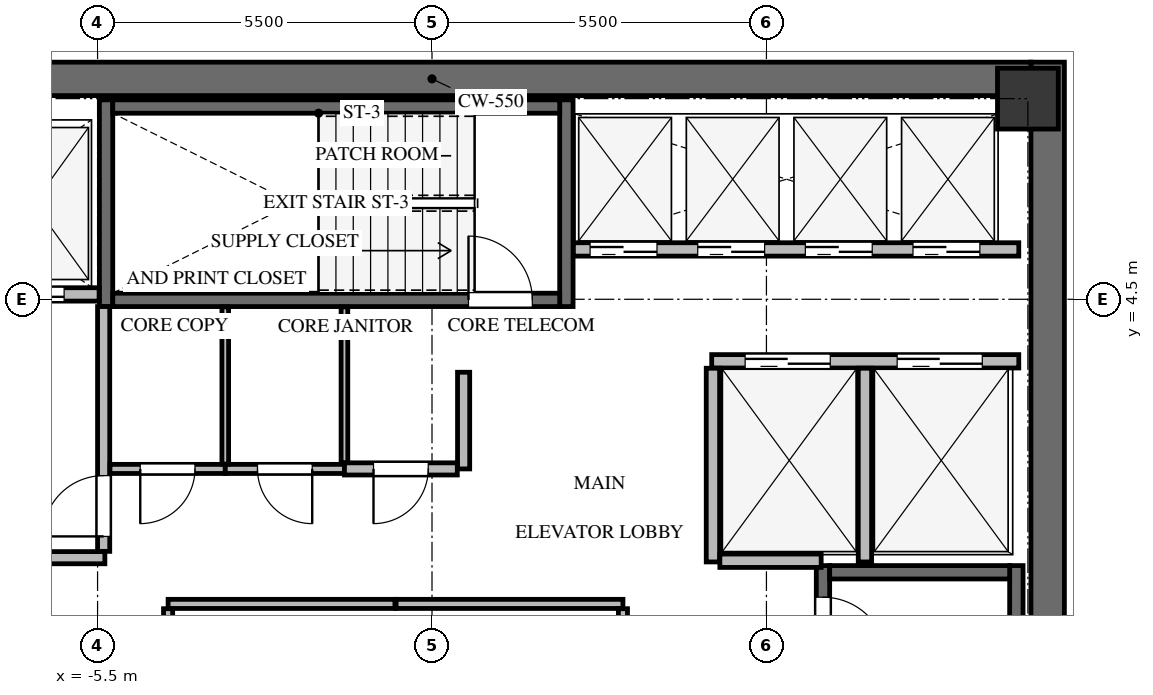
"""IFC4 building model, lengths in metres.
Left out: names, types, materials, properties, quantities, classifications, styles, units other than length and angle.
Written with IfcOpenShell. Run it as: python <this file> out.ifc"""

import sys

from ifc_helpers import new_model, si_unit, direction, frame, frame_2d, origin, origin_2d, place, context, subcontext, project, spatial, rectangle, extrude, source, transform, mapped, element, fill, save


model = new_model("IFC4")
c1 = context("Model", 3, precision=1e-05, world=origin(), true_north=direction((0.0, 1.0)))
c2 = subcontext(c1, "Body", "Model", "MODEL_VIEW")
j1 = project(units=[si_unit("LENGTHUNIT", "METRE"), si_unit("PLANEANGLEUNIT", "RADIAN")], contexts=[c1])
p1 = place(None, origin())
s1 = spatial("IfcSite", under=j1, at=p1, CompositionType="ELEMENT")
p2 = place(p1, origin())
s2 = spatial("IfcBuilding", under=s1, at=p2, CompositionType="ELEMENT")
p3 = place(p2, frame((0.0, 0.0, 244.7)))
s3 = spatial("IfcBuildingStorey", under=s2, at=p3, CompositionType="ELEMENT", Elevation=244.7)
p4 = place(p3, frame((10.125, -8.4, 0.0), z_axis=(0.0, 0.0, 1.0), x_axis=(0.0, 1.0, 0.0)))
e1 = element("IfcWall", 1, at=p4, inside=s3, PredefinedType="SHEAR", context=c2, shape_type="SweptSolid", body=[
    extrude(rectangle(XDim=16.8, YDim=0.55, at=frame_2d((8.4, 0.0))), origin(), (0.0, 0.0, 1.0), 3.3),
])
p5 = place(p3, frame((-9.85, 8.125, 0.0), z_axis=(0.0, 0.0, 1.0), x_axis=(1.0, 0.0, 0.0)))
e2 = element("IfcWall", 2, at=p5, inside=s3, PredefinedType="SHEAR", context=c2, shape_type="SweptSolid", body=[
    extrude(rectangle(XDim=19.7, YDim=0.55, at=frame_2d((9.85, 0.0))), origin(), (0.0, 0.0, 1.0), 3.3),
])
p6 = place(p3, frame((9.61, -7.77, -0.24), z_axis=(0.0, 0.0, 1.0), x_axis=(0.0, 1.0, 0.0)))
e3 = element("IfcWall", 3, at=p6, inside=s3, PredefinedType="SHEAR", context=c2, shape_type="SweptSolid", body=[
    extrude(rectangle(XDim=7.89, YDim=0.22, at=frame_2d((3.945, 0.0))), origin(), (0.0, 0.0, 1.0), 3.3),
])
p7 = place(p3, frame((6.43, 0.12, -0.24), z_axis=(0.0, 0.0, 1.0), x_axis=(0.0, -1.0, 0.0)))
e4 = element("IfcWall", 4, at=p7, inside=s3, PredefinedType="SHEAR", context=c2, shape_type="SweptSolid", body=[
    extrude(rectangle(XDim=7.89, YDim=0.22, at=frame_2d((3.945, 0.0))), origin(), (0.0, 0.0, 1.0), 3.3),
])
p8 = place(p7, frame((0.52, 0.0, 0.0)))
e5 = element("IfcOpeningElement", 5, at=p8, cuts=e4, PredefinedType="OPENING", context=c2, shape_type="SweptSolid", body=[
    extrude(rectangle(XDim=1.05, YDim=2.15, at=frame_2d((0.525, 1.075))), frame((0.0, 0.12, 0.0), z_axis=(0.0, -1.0, 0.0), x_axis=(1.0, 0.0, 0.0)), (0.0, 0.0, 1.0), 0.24),
])
p9 = place(p3, frame((9.5, 0.01, -0.24), z_axis=(0.0, 0.0, 1.0), x_axis=(-1.0, 0.0, 0.0)))
e6 = element("IfcWall", 6, at=p9, inside=s3, PredefinedType="SHEAR", context=c2, shape_type="SweptSolid", body=[
    extrude(rectangle(XDim=2.96, YDim=0.22, at=frame_2d((1.48, 0.0))), origin(), (0.0, 0.0, 1.0), 3.3),
])
for number, where, z_axis, x_axis in (
    (7, (2.21, 4.38, -0.24), (0.0, 0.0, 1.0), (0.0, 1.0, 0.0)),
    (8, (-5.36, 7.78, -0.24), (0.0, 0.0, 1.0), (0.0, -1.0, 0.0)),
):
    element("IfcWall", number, at=place(p3, frame(where, z_axis=z_axis, x_axis=x_axis)), inside=s3, PredefinedType="SHEAR", context=c2, shape_type="SweptSolid", body=[
        extrude(rectangle(XDim=3.4, YDim=0.22, at=frame_2d((1.7, 0.0))), origin(), (0.0, 0.0, 1.0), 3.3),
    ])
p10 = place(p3, frame((-5.25, 4.49, -0.24), z_axis=(0.0, 0.0, 1.0), x_axis=(1.0, 0.0, 0.0)))
e9 = element("IfcWall", 9, at=p10, inside=s3, PredefinedType="SHEAR", context=c2, shape_type="SweptSolid", body=[
    extrude(rectangle(XDim=7.35, YDim=0.22, at=frame_2d((3.675, 0.0))), origin(), (0.0, 0.0, 1.0), 3.3),
])
p11 = place(p10, frame((5.85, 0.0, 0.0)))
e10 = element("IfcOpeningElement", 10, at=p11, cuts=e9, PredefinedType="OPENING", context=c2, shape_type="SweptSolid", body=[
    extrude(rectangle(XDim=1.05, YDim=2.15, at=frame_2d((0.525, 1.075))), frame((0.0, 0.12, 0.0), z_axis=(0.0, -1.0, 0.0), x_axis=(1.0, 0.0, 0.0)), (0.0, 0.0, 1.0), 0.24),
])
p12 = place(p3, frame((2.1, 7.67, -0.24), z_axis=(0.0, 0.0, 1.0), x_axis=(-1.0, 0.0, 0.0)))
e11 = element("IfcWall", 11, at=p12, inside=s3, PredefinedType="SHEAR", context=c2, shape_type="SweptSolid", body=[
    extrude(rectangle(XDim=7.35, YDim=0.22, at=frame_2d((3.675, 0.0))), origin(), (0.0, 0.0, 1.0), 3.3),
])
m1 = source(origin(), c2, "Body", "SweptSolid", [
    extrude(rectangle(XDim=1.0, YDim=1.0, at=origin_2d()), origin(), (0.0, 0.0, 1.0), 3.3),
])
p13 = place(p3, frame((9.8, 7.8, -0.24), z_axis=(0.0, 0.0, 1.0), x_axis=(1.0, 0.0, 0.0)))
e12 = element("IfcColumn", 12, at=p13, inside=s3, PredefinedType="COLUMN", context=c2, shape_type="MappedRepresentation", body=[
    mapped(m1, transform((0.0, 0.0, 0.0), x_axis=(1.0, 0.0, 0.0), y_axis=(0.0, 1.0, 0.0), z_axis=(0.0, 0.0, 1.0), scale=1.0)),
])
p14 = place(p3, frame((-9.65, 4.58, 0.0), z_axis=(0.0, 0.0, 1.0), x_axis=(1.0, 0.0, 0.0)))
e13 = element("IfcWall", 13, at=p14, inside=s3, PredefinedType="SOLIDWALL", context=c2, shape_type="SweptSolid", body=[
    extrude(rectangle(XDim=4.175, YDim=0.22, at=frame_2d((2.087, 0.0))), origin(), (0.0, 0.0, 1.0), 3.045),
])
p15 = place(p14, frame((0.4, 0.0, 0.0)))
e14 = element("IfcOpeningElement", 14, at=p15, cuts=e13, PredefinedType="OPENING", context=c2, shape_type="SweptSolid", body=[
    extrude(rectangle(XDim=1.2, YDim=2.15, at=frame_2d((0.6, 1.075))), frame((0.0, 0.12, 0.0), z_axis=(0.0, -1.0, 0.0), x_axis=(1.0, 0.0, 0.0)), (0.0, 0.0, 1.0), 0.24),
])
p16 = place(p14, frame((2.4, 0.0, 0.0)))
e15 = element("IfcOpeningElement", 15, at=p16, cuts=e13, PredefinedType="OPENING", context=c2, shape_type="SweptSolid", body=[
    extrude(rectangle(XDim=1.2, YDim=2.15, at=frame_2d((0.6, 1.075))), frame((0.0, 0.12, 0.0), z_axis=(0.0, -1.0, 0.0), x_axis=(1.0, 0.0, 0.0)), (0.0, 0.0, 1.0), 0.24),
])
p17 = place(p3, frame((-9.65, 0.25, 0.0), z_axis=(0.0, 0.0, 1.0), x_axis=(1.0, 0.0, 0.0)))
e16 = element("IfcWall", 16, at=p17, inside=s3, PredefinedType="SOLIDWALL", context=c2, shape_type="SweptSolid", body=[
    extrude(rectangle(XDim=4.27, YDim=0.2, at=frame_2d((2.135, 0.0))), origin(), (0.0, 0.0, 1.0), 3.045),
])
p18 = place(p3, frame((-5.4, 0.354, 0.0), z_axis=(0.0, 0.0, 1.0), x_axis=(0.0, 1.0, 0.0)))
e17 = element("IfcWall", 17, at=p18, inside=s3, PredefinedType="SOLIDWALL", context=c2, shape_type="SweptSolid", body=[
    extrude(rectangle(XDim=4.026, YDim=0.2, at=frame_2d((2.013, 0.0))), origin(), (0.0, 0.0, 1.0), 3.045),
])
p19 = place(p18, frame((0.246, 0.0, 0.0)))
e18 = element("IfcOpeningElement", 18, at=p19, cuts=e17, PredefinedType="OPENING", context=c2, shape_type="SweptSolid", body=[
    extrude(rectangle(XDim=1.0, YDim=2.15, at=frame_2d((0.5, 1.075))), frame((0.0, 0.11, 0.0), z_axis=(0.0, -1.0, 0.0), x_axis=(1.0, 0.0, 0.0)), (0.0, 0.0, 1.0), 0.22),
])
p20 = place(p3, frame((4.6, 3.48, 0.0), z_axis=(0.0, 0.0, 1.0), x_axis=(1.0, 0.0, 0.0)))
e19 = element("IfcWall", 19, at=p20, inside=s3, PredefinedType="SOLIDWALL", context=c2, shape_type="SweptSolid", body=[
    extrude(rectangle(XDim=5.05, YDim=0.22, at=frame_2d((2.525, 0.0))), origin(), (0.0, 0.0, 1.0), 3.045),
])
p21 = place(p20, frame((0.55, 0.0, 0.0)))
e20 = element("IfcOpeningElement", 20, at=p21, cuts=e19, PredefinedType="OPENING", context=c2, shape_type="SweptSolid", body=[
    extrude(rectangle(XDim=1.4, YDim=2.15, at=frame_2d((0.7, 1.075))), frame((0.0, 0.12, 0.0), z_axis=(0.0, -1.0, 0.0), x_axis=(1.0, 0.0, 0.0)), (0.0, 0.0, 1.0), 0.24),
])
p22 = place(p20, frame((3.05, 0.0, 0.0)))
e21 = element("IfcOpeningElement", 21, at=p22, cuts=e19, PredefinedType="OPENING", context=c2, shape_type="SweptSolid", body=[
    extrude(rectangle(XDim=1.4, YDim=2.15, at=frame_2d((0.7, 1.075))), frame((0.0, 0.12, 0.0), z_axis=(0.0, -1.0, 0.0), x_axis=(1.0, 0.0, 0.0)), (0.0, 0.0, 1.0), 0.24),
])
for number, where, z_axis, x_axis in (
    (22, (4.62, 0.18, 0.0), (0.0, 0.0, 1.0), (0.0, 1.0, 0.0)),
    (23, (7.12, 0.18, 0.0), (0.0, 0.0, 1.0), (0.0, 1.0, 0.0)),
):
    element("IfcWall", number, at=place(p3, frame(where, z_axis=z_axis, x_axis=x_axis)), inside=s3, PredefinedType="SOLIDWALL", context=c2, shape_type="SweptSolid", body=[
        extrude(rectangle(XDim=3.186, YDim=0.22, at=frame_2d((1.593, 0.0))), origin(), (0.0, 0.0, 1.0), 3.045),
    ])
p23 = place(p3, frame((4.734, 0.2, 0.0), z_axis=(0.0, 0.0, 1.0), x_axis=(1.0, 0.0, 0.0)))
e24 = element("IfcWall", 24, at=p23, inside=s3, PredefinedType="SOLIDWALL", context=c2, shape_type="SweptSolid", body=[
    extrude(rectangle(XDim=1.666, YDim=0.22, at=frame_2d((0.833, 0.0))), origin(), (0.0, 0.0, 1.0), 3.045),
])
p24 = place(p3, frame((2.325, 5.32, 0.0), z_axis=(0.0, 0.0, 1.0), x_axis=(1.0, 0.0, 0.0)))
e25 = element("IfcWall", 25, at=p24, inside=s3, PredefinedType="SOLIDWALL", context=c2, shape_type="SweptSolid", body=[
    extrude(rectangle(XDim=7.325, YDim=0.22, at=frame_2d((3.663, 0.0))), origin(), (0.0, 0.0, 1.0), 3.045),
])
p25 = place(p24, frame((0.275, 0.0, 0.0)))
e26 = element("IfcOpeningElement", 26, at=p25, cuts=e25, PredefinedType="OPENING", context=c2, shape_type="SweptSolid", body=[
    extrude(rectangle(XDim=1.1, YDim=2.15, at=frame_2d((0.55, 1.075))), frame((0.0, 0.12, 0.0), z_axis=(0.0, -1.0, 0.0), x_axis=(1.0, 0.0, 0.0)), (0.0, 0.0, 1.0), 0.24),
])
p26 = place(p24, frame((2.045, 0.0, 0.0)))
e27 = element("IfcOpeningElement", 27, at=p26, cuts=e25, PredefinedType="OPENING", context=c2, shape_type="SweptSolid", body=[
    extrude(rectangle(XDim=1.1, YDim=2.15, at=frame_2d((0.55, 1.075))), frame((0.0, 0.12, 0.0), z_axis=(0.0, -1.0, 0.0), x_axis=(1.0, 0.0, 0.0)), (0.0, 0.0, 1.0), 0.24),
])
p27 = place(p24, frame((3.815, 0.0, 0.0)))
e28 = element("IfcOpeningElement", 28, at=p27, cuts=e25, PredefinedType="OPENING", context=c2, shape_type="SweptSolid", body=[
    extrude(rectangle(XDim=1.1, YDim=2.15, at=frame_2d((0.55, 1.075))), frame((0.0, 0.12, 0.0), z_axis=(0.0, -1.0, 0.0), x_axis=(1.0, 0.0, 0.0)), (0.0, 0.0, 1.0), 0.24),
])
p28 = place(p24, frame((5.585, 0.0, 0.0)))
e29 = element("IfcOpeningElement", 29, at=p28, cuts=e25, PredefinedType="OPENING", context=c2, shape_type="SweptSolid", body=[
    extrude(rectangle(XDim=1.1, YDim=2.15, at=frame_2d((0.55, 1.075))), frame((0.0, 0.12, 0.0), z_axis=(0.0, -1.0, 0.0), x_axis=(1.0, 0.0, 0.0)), (0.0, 0.0, 1.0), 0.24),
])
p29 = place(p3, frame((-4.34, -0.51, 0.0), z_axis=(0.0, 0.0, 1.0), x_axis=(1.0, 0.0, 0.0)))
e30 = element("IfcWall", 30, at=p29, inside=s3, PredefinedType="PARTITIONING", context=c2, shape_type="SweptSolid", body=[
    extrude(rectangle(XDim=3.73, YDim=0.15, at=frame_2d((1.865, 0.0))), origin(), (0.0, 0.0, 1.0), 3.045),
])
p30 = place(p3, frame((-4.34, -2.961, 0.0), z_axis=(0.0, 0.0, 1.0), x_axis=(0.0, 1.0, 0.0)))
e31 = element("IfcWall", 31, at=p30, inside=s3, PredefinedType="PARTITIONING", context=c2, shape_type="SweptSolid", body=[
    extrude(rectangle(XDim=2.372, YDim=0.15, at=frame_2d((1.186, 0.0))), origin(), (0.0, 0.0, 1.0), 3.045),
])
p31 = place(p3, frame((-0.59, -0.51, 0.0), z_axis=(0.0, 0.0, 1.0), x_axis=(1.0, 0.0, 0.0)))
e32 = element("IfcWall", 32, at=p31, inside=s3, PredefinedType="PARTITIONING", context=c2, shape_type="SweptSolid", body=[
    extrude(rectangle(XDim=3.73, YDim=0.15, at=frame_2d((1.865, 0.0))), origin(), (0.0, 0.0, 1.0), 3.045),
])
p32 = place(p3, frame((3.14, -0.589, 0.0), z_axis=(0.0, 0.0, 1.0), x_axis=(0.0, -1.0, 0.0)))
e33 = element("IfcWall", 33, at=p32, inside=s3, PredefinedType="PARTITIONING", context=c2, shape_type="SweptSolid", body=[
    extrude(rectangle(XDim=2.372, YDim=0.15, at=frame_2d((1.186, 0.0))), origin(), (0.0, 0.0, 1.0), 3.045),
])
p33 = place(p3, frame((-3.4, 1.71, 0.0), z_axis=(0.0, 0.0, 1.0), x_axis=(-1.0, 0.0, 0.0)))
e34 = element("IfcWall", 34, at=p33, inside=s3, PredefinedType="PARTITIONING", context=c2, shape_type="SweptSolid", body=[
    extrude(rectangle(XDim=1.896, YDim=0.15, at=frame_2d((0.948, 0.0))), origin(), (0.0, 0.0, 1.0), 3.045),
])
p34 = place(p33, frame((0.498, 0.0, 0.0)))
e35 = element("IfcOpeningElement", 35, at=p34, cuts=e34, PredefinedType="OPENING", context=c2, shape_type="SweptSolid", body=[
    extrude(rectangle(XDim=0.9, YDim=2.05, at=frame_2d((0.45, 1.025))), frame((0.0, 0.085, 0.0), z_axis=(0.0, -1.0, 0.0), x_axis=(1.0, 0.0, 0.0)), (0.0, 0.0, 1.0), 0.17),
])
p35 = place(p3, frame((-1.44, 1.71, 0.0), z_axis=(0.0, 0.0, 1.0), x_axis=(-1.0, 0.0, 0.0)))
e36 = element("IfcWall", 36, at=p35, inside=s3, PredefinedType="PARTITIONING", context=c2, shape_type="SweptSolid", body=[
    extrude(rectangle(XDim=1.96, YDim=0.15, at=frame_2d((0.98, 0.0))), origin(), (0.0, 0.0, 1.0), 3.045),
])
p36 = place(p35, frame((0.53, 0.0, 0.0)))
e37 = element("IfcOpeningElement", 37, at=p36, cuts=e36, PredefinedType="OPENING", context=c2, shape_type="SweptSolid", body=[
    extrude(rectangle(XDim=0.9, YDim=2.05, at=frame_2d((0.45, 1.025))), frame((0.0, 0.085, 0.0), z_axis=(0.0, -1.0, 0.0), x_axis=(1.0, 0.0, 0.0)), (0.0, 0.0, 1.0), 0.17),
])
p37 = place(p3, frame((0.52, 3.3, 0.0), z_axis=(0.0, 0.0, 1.0), x_axis=(0.0, -1.0, 0.0)))
e38 = element("IfcWall", 38, at=p37, inside=s3, PredefinedType="SOLIDWALL", context=c2, shape_type="SweptSolid", body=[
    extrude(rectangle(XDim=1.59, YDim=0.2, at=frame_2d((0.795, 0.0))), origin(), (0.0, 0.0, 1.0), 3.045),
])
p38 = place(p3, frame((0.416, 1.71, 0.0), z_axis=(0.0, 0.0, 1.0), x_axis=(-1.0, 0.0, 0.0)))
e39 = element("IfcWall", 39, at=p38, inside=s3, PredefinedType="SOLIDWALL", context=c2, shape_type="SweptSolid", body=[
    extrude(rectangle(XDim=1.856, YDim=0.2, at=frame_2d((0.928, 0.0))), origin(), (0.0, 0.0, 1.0), 3.045),
])
p39 = place(p38, frame((0.478, 0.0, 0.0)))
e40 = element("IfcOpeningElement", 40, at=p39, cuts=e39, PredefinedType="OPENING", context=c2, shape_type="SweptSolid", body=[
    extrude(rectangle(XDim=0.9, YDim=2.05, at=frame_2d((0.45, 1.025))), frame((0.0, 0.11, 0.0), z_axis=(0.0, -1.0, 0.0), x_axis=(1.0, 0.0, 0.0)), (0.0, 0.0, 1.0), 0.22),
])
p40 = place(p3, frame((-3.4, 4.375, 0.0), z_axis=(0.0, 0.0, 1.0), x_axis=(0.0, -1.0, 0.0)))
e41 = element("IfcWall", 41, at=p40, inside=s3, PredefinedType="MOVABLE", context=c2, shape_type="SweptSolid", body=[
    extrude(rectangle(XDim=2.586, YDim=0.11, at=frame_2d((1.293, 0.0))), origin(), (0.0, 0.0, 1.0), 3.045),
])
p41 = place(p3, frame((-1.44, 4.375, 0.0), z_axis=(0.0, 0.0, 1.0), x_axis=(0.0, -1.0, 0.0)))
e42 = element("IfcWall", 42, at=p41, inside=s3, PredefinedType="MOVABLE", context=c2, shape_type="SweptSolid", body=[
    extrude(rectangle(XDim=2.561, YDim=0.11, at=frame_2d((1.281, 0.0))), origin(), (0.0, 0.0, 1.0), 3.045),
])
m2 = source(origin(), c2, "Body", "SweptSolid", [
    extrude(rectangle(XDim=1.05, YDim=2.15, at=frame_2d((0.525, 1.075))), frame((0.0, 0.025, 0.0), z_axis=(0.0, -1.0, 0.0), x_axis=(1.0, 0.0, 0.0)), (0.0, 0.0, 1.0), 0.05),
])
p42 = place(p8, origin())
e43 = element("IfcDoor", 43, at=p42, inside=s3, OperationType="SINGLE_SWING_RIGHT", PredefinedType="DOOR", context=c2, shape_type="MappedRepresentation", body=[
    mapped(m2, transform((0.0, 0.0, 0.0), x_axis=(1.0, 0.0, 0.0), y_axis=(0.0, 1.0, 0.0), z_axis=(0.0, 0.0, 1.0), scale=1.0)),
])
fill(e5, e43)
m3 = source(origin(), c2, "Body", "SweptSolid", [
    extrude(rectangle(XDim=1.05, YDim=2.15, at=frame_2d((0.525, 1.075))), frame((0.0, 0.025, 0.0), z_axis=(0.0, -1.0, 0.0), x_axis=(1.0, 0.0, 0.0)), (0.0, 0.0, 1.0), 0.05),
])
p43 = place(p11, origin())
e44 = element("IfcDoor", 44, at=p43, inside=s3, OperationType="SINGLE_SWING_LEFT", PredefinedType="DOOR", context=c2, shape_type="MappedRepresentation", body=[
    mapped(m3, transform((0.0, 0.0, 0.0), x_axis=(1.0, 0.0, 0.0), y_axis=(0.0, 1.0, 0.0), z_axis=(0.0, 0.0, 1.0), scale=1.0)),
])
fill(e10, e44)
m4 = source(origin(), c2, "Body", "SweptSolid", [
    extrude(rectangle(XDim=1.2, YDim=2.15, at=frame_2d((0.6, 1.075))), frame((0.0, 0.025, 0.0), z_axis=(0.0, -1.0, 0.0), x_axis=(1.0, 0.0, 0.0)), (0.0, 0.0, 1.0), 0.05),
])
p44 = place(p16, origin())
e45 = element("IfcDoor", 45, at=p44, inside=s3, OperationType="DOUBLE_DOOR_SLIDING", PredefinedType="DOOR", context=c2, shape_type="MappedRepresentation", body=[
    mapped(m4, transform((0.0, 0.0, 0.0), x_axis=(1.0, 0.0, 0.0), y_axis=(0.0, 1.0, 0.0), z_axis=(0.0, 0.0, 1.0), scale=1.0)),
])
fill(e15, e45)
m5 = source(origin(), c2, "Body", "SweptSolid", [
    extrude(rectangle(XDim=1.0, YDim=2.15, at=frame_2d((0.5, 1.075))), frame((0.0, 0.025, 0.0), z_axis=(0.0, -1.0, 0.0), x_axis=(1.0, 0.0, 0.0)), (0.0, 0.0, 1.0), 0.05),
])
p45 = place(p19, origin())
e46 = element("IfcDoor", 46, at=p45, inside=s3, OperationType="SINGLE_SWING_LEFT", PredefinedType="DOOR", context=c2, shape_type="MappedRepresentation", body=[
    mapped(m5, transform((0.0, 0.0, 0.0), x_axis=(1.0, 0.0, 0.0), y_axis=(0.0, 1.0, 0.0), z_axis=(0.0, 0.0, 1.0), scale=1.0)),
])
fill(e18, e46)
m6 = source(origin(), c2, "Body", "SweptSolid", [
    extrude(rectangle(XDim=1.4, YDim=2.15, at=frame_2d((0.7, 1.075))), frame((0.0, 0.025, 0.0), z_axis=(0.0, -1.0, 0.0), x_axis=(1.0, 0.0, 0.0)), (0.0, 0.0, 1.0), 0.05),
])
p46 = place(p21, origin())
e47 = element("IfcDoor", 47, at=p46, inside=s3, OperationType="DOUBLE_DOOR_SLIDING", PredefinedType="DOOR", context=c2, shape_type="MappedRepresentation", body=[
    mapped(m6, transform((0.0, 0.0, 0.0), x_axis=(1.0, 0.0, 0.0), y_axis=(0.0, 1.0, 0.0), z_axis=(0.0, 0.0, 1.0), scale=1.0)),
])
fill(e20, e47)
p47 = place(p22, origin())
e48 = element("IfcDoor", 48, at=p47, inside=s3, OperationType="DOUBLE_DOOR_SLIDING", PredefinedType="DOOR", context=c2, shape_type="MappedRepresentation", body=[
    mapped(m6, transform((0.0, 0.0, 0.0), x_axis=(1.0, 0.0, 0.0), y_axis=(0.0, 1.0, 0.0), z_axis=(0.0, 0.0, 1.0), scale=1.0)),
])
fill(e21, e48)
m7 = source(origin(), c2, "Body", "SweptSolid", [
    extrude(rectangle(XDim=1.1, YDim=2.15, at=frame_2d((0.55, 1.075))), frame((0.0, 0.025, 0.0), z_axis=(0.0, -1.0, 0.0), x_axis=(1.0, 0.0, 0.0)), (0.0, 0.0, 1.0), 0.05),
])
p48 = place(p25, origin())
e49 = element("IfcDoor", 49, at=p48, inside=s3, OperationType="DOUBLE_DOOR_SLIDING", PredefinedType="DOOR", context=c2, shape_type="MappedRepresentation", body=[
    mapped(m7, transform((0.0, 0.0, 0.0), x_axis=(1.0, 0.0, 0.0), y_axis=(0.0, 1.0, 0.0), z_axis=(0.0, 0.0, 1.0), scale=1.0)),
])
fill(e26, e49)
p49 = place(p26, origin())
e50 = element("IfcDoor", 50, at=p49, inside=s3, OperationType="DOUBLE_DOOR_SLIDING", PredefinedType="DOOR", context=c2, shape_type="MappedRepresentation", body=[
    mapped(m7, transform((0.0, 0.0, 0.0), x_axis=(1.0, 0.0, 0.0), y_axis=(0.0, 1.0, 0.0), z_axis=(0.0, 0.0, 1.0), scale=1.0)),
])
fill(e27, e50)
p50 = place(p27, origin())
e51 = element("IfcDoor", 51, at=p50, inside=s3, OperationType="DOUBLE_DOOR_SLIDING", PredefinedType="DOOR", context=c2, shape_type="MappedRepresentation", body=[
    mapped(m7, transform((0.0, 0.0, 0.0), x_axis=(1.0, 0.0, 0.0), y_axis=(0.0, 1.0, 0.0), z_axis=(0.0, 0.0, 1.0), scale=1.0)),
])
fill(e28, e51)
p51 = place(p28, origin())
e52 = element("IfcDoor", 52, at=p51, inside=s3, OperationType="DOUBLE_DOOR_SLIDING", PredefinedType="DOOR", context=c2, shape_type="MappedRepresentation", body=[
    mapped(m7, transform((0.0, 0.0, 0.0), x_axis=(1.0, 0.0, 0.0), y_axis=(0.0, 1.0, 0.0), z_axis=(0.0, 0.0, 1.0), scale=1.0)),
])
fill(e29, e52)
m8 = source(origin(), c2, "Body", "SweptSolid", [
    extrude(rectangle(XDim=0.9, YDim=2.05, at=frame_2d((0.45, 1.025))), frame((0.0, 0.025, 0.0), z_axis=(0.0, -1.0, 0.0), x_axis=(1.0, 0.0, 0.0)), (0.0, 0.0, 1.0), 0.05),
])
p52 = place(p34, origin())
e53 = element("IfcDoor", 53, at=p52, inside=s3, OperationType="SINGLE_SWING_RIGHT", PredefinedType="DOOR", context=c2, shape_type="MappedRepresentation", body=[
    mapped(m8, transform((0.0, 0.0, 0.0), x_axis=(1.0, 0.0, 0.0), y_axis=(0.0, 1.0, 0.0), z_axis=(0.0, 0.0, 1.0), scale=1.0)),
])
fill(e35, e53)
m9 = source(origin(), c2, "Body", "SweptSolid", [
    extrude(rectangle(XDim=0.9, YDim=2.05, at=frame_2d((0.45, 1.025))), frame((0.0, 0.025, 0.0), z_axis=(0.0, -1.0, 0.0), x_axis=(1.0, 0.0, 0.0)), (0.0, 0.0, 1.0), 0.05),
])
p53 = place(p36, origin())
e54 = element("IfcDoor", 54, at=p53, inside=s3, OperationType="SINGLE_SWING_LEFT", PredefinedType="DOOR", context=c2, shape_type="MappedRepresentation", body=[
    mapped(m9, transform((0.0, 0.0, 0.0), x_axis=(1.0, 0.0, 0.0), y_axis=(0.0, 1.0, 0.0), z_axis=(0.0, 0.0, 1.0), scale=1.0)),
])
fill(e37, e54)
p54 = place(p39, origin())
e55 = element("IfcDoor", 55, at=p54, inside=s3, OperationType="SINGLE_SWING_RIGHT", PredefinedType="DOOR", context=c2, shape_type="MappedRepresentation", body=[
    mapped(m8, transform((0.0, 0.0, 0.0), x_axis=(1.0, 0.0, 0.0), y_axis=(0.0, 1.0, 0.0), z_axis=(0.0, 0.0, 1.0), scale=1.0)),
])
fill(e40, e55)
save(model, sys.argv[1])
